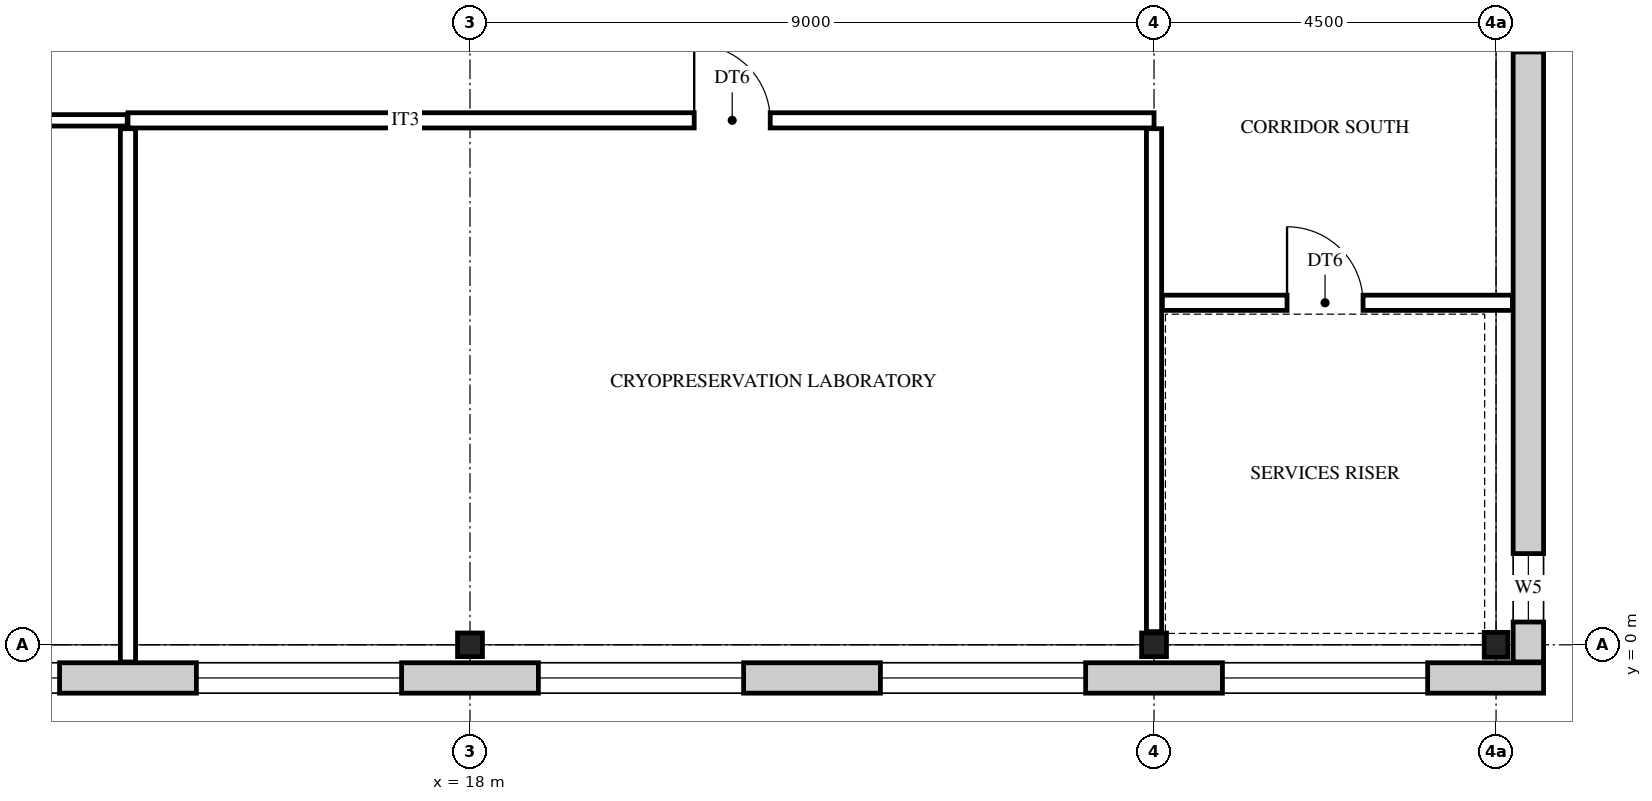
"""IFC4 building model, lengths in metres.
Left out: names, types, materials, properties, quantities, classifications, styles, units other than length and angle.
Written with IfcOpenShell. Run it as: python <this file> out.ifc"""

import sys

from ifc_helpers import new_model, si_unit, direction, frame, frame_2d, origin, origin_2d, place, context, subcontext, project, spatial, rectangle, i_section, extrude, element, fill, save


model = new_model("IFC4")
c1 = context("Model", 3, precision=1e-05, world=origin(), true_north=direction((0.0, 1.0)))
c2 = subcontext(c1, "Body", "Model", "MODEL_VIEW")
j1 = project(units=[si_unit("LENGTHUNIT", "METRE"), si_unit("PLANEANGLEUNIT", "RADIAN")], contexts=[c1])
p1 = place(None, origin())
s1 = spatial("IfcSite", under=j1, at=p1, CompositionType="ELEMENT")
p2 = place(p1, origin())
s2 = spatial("IfcBuilding", under=s1, at=p2, CompositionType="ELEMENT")
p3 = place(p2, frame((0.0, 0.0, 27.6)))
s3 = spatial("IfcBuildingStorey", under=s2, at=p3, CompositionType="ELEMENT", Elevation=27.6)
for number, where, z_axis, x_axis in (
    (1, (18.0, 0.0, 0.0), (0.0, 0.0, 1.0), (0.0, 1.0, 0.0)),
    (2, (27.0, 0.0, 0.0), (0.0, 0.0, 1.0), (0.0, 1.0, 0.0)),
    (3, (31.5, 0.0, 0.0), (0.0, 0.0, 1.0), (1.0, 0.0, 0.0)),
):
    element("IfcColumn", number, at=place(p3, frame(where, z_axis=z_axis, x_axis=x_axis)), inside=s3, PredefinedType="COLUMN", context=c2, shape_type="SweptSolid", body=[
        extrude(i_section(OverallWidth=0.311, OverallDepth=0.327, WebThickness=0.016, FlangeThickness=0.025, FilletRadius=0.017, at=origin_2d()), origin(), (0.0, 0.0, 1.0), 4.2),
    ])
p4 = place(p3, frame((32.125, -0.436, 0.0), z_axis=(0.0, 0.0, 1.0), x_axis=(-1.0, 0.0, 0.0)))
e4 = element("IfcWall", 4, at=p4, inside=s3, PredefinedType="STANDARD", context=c2, shape_type="SweptSolid", body=[
    extrude(rectangle(XDim=32.75, YDim=0.4, at=frame_2d((16.375, 0.0))), origin(), (0.0, 0.0, 1.0), 4.2),
])
p5 = place(p4, frame((28.525, 0.0, 0.9)))
e5 = element("IfcOpeningElement", 5, at=p5, cuts=e4, PredefinedType="OPENING", context=c2, shape_type="SweptSolid", body=[
    extrude(rectangle(XDim=2.7, YDim=2.5, at=frame_2d((1.35, 1.25))), frame((0.0, 0.21, 0.0), z_axis=(0.0, -1.0, 0.0), x_axis=(1.0, 0.0, 0.0)), (0.0, 0.0, 1.0), 0.42),
])
p6 = place(p4, frame((24.025, 0.0, 0.9)))
e6 = element("IfcOpeningElement", 6, at=p6, cuts=e4, PredefinedType="OPENING", context=c2, shape_type="SweptSolid", body=[
    extrude(rectangle(XDim=2.7, YDim=2.5, at=frame_2d((1.35, 1.25))), frame((0.0, 0.21, 0.0), z_axis=(0.0, -1.0, 0.0), x_axis=(1.0, 0.0, 0.0)), (0.0, 0.0, 1.0), 0.42),
])
p7 = place(p4, frame((19.525, 0.0, 0.9)))
e7 = element("IfcOpeningElement", 7, at=p7, cuts=e4, PredefinedType="OPENING", context=c2, shape_type="SweptSolid", body=[
    extrude(rectangle(XDim=2.7, YDim=2.5, at=frame_2d((1.35, 1.25))), frame((0.0, 0.21, 0.0), z_axis=(0.0, -1.0, 0.0), x_axis=(1.0, 0.0, 0.0)), (0.0, 0.0, 1.0), 0.42),
])
p8 = place(p4, frame((15.025, 0.0, 0.9)))
e8 = element("IfcOpeningElement", 8, at=p8, cuts=e4, PredefinedType="OPENING", context=c2, shape_type="SweptSolid", body=[
    extrude(rectangle(XDim=2.7, YDim=2.5, at=frame_2d((1.35, 1.25))), frame((0.0, 0.21, 0.0), z_axis=(0.0, -1.0, 0.0), x_axis=(1.0, 0.0, 0.0)), (0.0, 0.0, 1.0), 0.42),
])
p9 = place(p4, frame((10.525, 0.0, 0.9)))
e9 = element("IfcOpeningElement", 9, at=p9, cuts=e4, PredefinedType="OPENING", context=c2, shape_type="SweptSolid", body=[
    extrude(rectangle(XDim=2.7, YDim=2.5, at=frame_2d((1.35, 1.25))), frame((0.0, 0.21, 0.0), z_axis=(0.0, -1.0, 0.0), x_axis=(1.0, 0.0, 0.0)), (0.0, 0.0, 1.0), 0.42),
])
p10 = place(p4, frame((6.025, 0.0, 0.9)))
e10 = element("IfcOpeningElement", 10, at=p10, cuts=e4, PredefinedType="OPENING", context=c2, shape_type="SweptSolid", body=[
    extrude(rectangle(XDim=2.7, YDim=2.5, at=frame_2d((1.35, 1.25))), frame((0.0, 0.21, 0.0), z_axis=(0.0, -1.0, 0.0), x_axis=(1.0, 0.0, 0.0)), (0.0, 0.0, 1.0), 0.42),
])
p11 = place(p4, frame((1.525, 0.0, 0.9)))
e11 = element("IfcOpeningElement", 11, at=p11, cuts=e4, PredefinedType="OPENING", context=c2, shape_type="SweptSolid", body=[
    extrude(rectangle(XDim=2.7, YDim=2.5, at=frame_2d((1.35, 1.25))), frame((0.0, 0.21, 0.0), z_axis=(0.0, -1.0, 0.0), x_axis=(1.0, 0.0, 0.0)), (0.0, 0.0, 1.0), 0.42),
])
p12 = place(p3, frame((31.925, 27.225, 0.0), z_axis=(0.0, 0.0, 1.0), x_axis=(0.0, -1.0, 0.0)))
e12 = element("IfcWall", 12, at=p12, inside=s3, PredefinedType="STANDARD", context=c2, shape_type="SweptSolid", body=[
    extrude(rectangle(XDim=27.45, YDim=0.4, at=frame_2d((13.725, 0.0))), origin(), (0.0, 0.0, 1.0), 4.2),
])
p13 = place(p12, frame((26.025, 0.0, 0.9)))
e13 = element("IfcOpeningElement", 13, at=p13, cuts=e12, PredefinedType="OPENING", context=c2, shape_type="SweptSolid", body=[
    extrude(rectangle(XDim=0.9, YDim=2.0, at=frame_2d((0.45, 1.0))), frame((0.0, 0.21, 0.0), z_axis=(0.0, -1.0, 0.0), x_axis=(1.0, 0.0, 0.0)), (0.0, 0.0, 1.0), 0.42),
])
p14 = place(p12, frame((18.525, 0.0, 0.9)))
e14 = element("IfcOpeningElement", 14, at=p14, cuts=e12, PredefinedType="OPENING", context=c2, shape_type="SweptSolid", body=[
    extrude(rectangle(XDim=0.9, YDim=2.0, at=frame_2d((0.45, 1.0))), frame((0.0, 0.21, 0.0), z_axis=(0.0, -1.0, 0.0), x_axis=(1.0, 0.0, 0.0)), (0.0, 0.0, 1.0), 0.42),
])
p15 = place(p12, frame((15.675, 0.0, 1.6)))
e15 = element("IfcOpeningElement", 15, at=p15, cuts=e12, PredefinedType="OPENING", context=c2, shape_type="SweptSolid", body=[
    extrude(rectangle(XDim=0.6, YDim=0.9, at=frame_2d((0.3, 0.45))), frame((0.0, 0.21, 0.0), z_axis=(0.0, -1.0, 0.0), x_axis=(1.0, 0.0, 0.0)), (0.0, 0.0, 1.0), 0.42),
])
p16 = place(p12, frame((11.175, 0.0, 1.6)))
e16 = element("IfcOpeningElement", 16, at=p16, cuts=e12, PredefinedType="OPENING", context=c2, shape_type="SweptSolid", body=[
    extrude(rectangle(XDim=0.6, YDim=0.9, at=frame_2d((0.3, 0.45))), frame((0.0, 0.21, 0.0), z_axis=(0.0, -1.0, 0.0), x_axis=(1.0, 0.0, 0.0)), (0.0, 0.0, 1.0), 0.42),
])
p17 = place(p12, frame((8.025, 0.0, 0.9)))
e17 = element("IfcOpeningElement", 17, at=p17, cuts=e12, PredefinedType="OPENING", context=c2, shape_type="SweptSolid", body=[
    extrude(rectangle(XDim=0.9, YDim=2.0, at=frame_2d((0.45, 1.0))), frame((0.0, 0.21, 0.0), z_axis=(0.0, -1.0, 0.0), x_axis=(1.0, 0.0, 0.0)), (0.0, 0.0, 1.0), 0.42),
])
p18 = place(p12, frame((0.525, 0.0, 0.9)))
e18 = element("IfcOpeningElement", 18, at=p18, cuts=e12, PredefinedType="OPENING", context=c2, shape_type="SweptSolid", body=[
    extrude(rectangle(XDim=0.9, YDim=2.0, at=frame_2d((0.45, 1.0))), frame((0.0, 0.21, 0.0), z_axis=(0.0, -1.0, 0.0), x_axis=(1.0, 0.0, 0.0)), (0.0, 0.0, 1.0), 0.42),
])
p19 = place(p3, frame((13.5, -0.226, 0.0), z_axis=(0.0, 0.0, 1.0), x_axis=(0.0, 1.0, 0.0)))
e19 = element("IfcWall", 19, at=p19, inside=s3, PredefinedType="PARTITIONING", context=c2, shape_type="SweptSolid", body=[
    extrude(rectangle(XDim=7.016, YDim=0.2, at=frame_2d((3.508, 0.0))), origin(), (0.0, 0.0, 1.0), 3.537),
])
p20 = place(p3, frame((27.0, 0.174, 0.0), z_axis=(0.0, 0.0, 1.0), x_axis=(0.0, 1.0, 0.0)))
e20 = element("IfcWall", 20, at=p20, inside=s3, PredefinedType="PARTITIONING", context=c2, shape_type="SweptSolid", body=[
    extrude(rectangle(XDim=6.616, YDim=0.2, at=frame_2d((3.308, 0.0))), origin(), (0.0, 0.0, 1.0), 3.537),
])
p21 = place(p3, frame((27.11, 4.5, 0.0), z_axis=(0.0, 0.0, 1.0), x_axis=(1.0, 0.0, 0.0)))
e21 = element("IfcWall", 21, at=p21, inside=s3, PredefinedType="PARTITIONING", context=c2, shape_type="SweptSolid", body=[
    extrude(rectangle(XDim=4.605, YDim=0.2, at=frame_2d((2.302, 0.0))), origin(), (0.0, 0.0, 1.0), 3.537),
])
p22 = place(p21, frame((1.64, 0.0, 0.0)))
e22 = element("IfcOpeningElement", 22, at=p22, cuts=e21, PredefinedType="OPENING", context=c2, shape_type="SweptSolid", body=[
    extrude(rectangle(XDim=1.0, YDim=2.1, at=frame_2d((0.5, 1.05))), frame((0.0, 0.11, 0.0), z_axis=(0.0, -1.0, 0.0), x_axis=(1.0, 0.0, 0.0)), (0.0, 0.0, 1.0), 0.22),
])
p23 = place(p3, frame((6.985, 6.9, 0.0), z_axis=(0.0, 0.0, 1.0), x_axis=(1.0, 0.0, 0.0)))
e23 = element("IfcWall", 23, at=p23, inside=s3, PredefinedType="PARTITIONING", context=c2, shape_type="SweptSolid", body=[
    extrude(rectangle(XDim=6.505, YDim=0.15, at=frame_2d((3.252, 0.0))), origin(), (0.0, 0.0, 1.0), 3.537),
])
p24 = place(p23, frame((1.615, 0.0, 0.0)))
e24 = element("IfcOpeningElement", 24, at=p24, cuts=e23, PredefinedType="OPENING", context=c2, shape_type="SweptSolid", body=[
    extrude(rectangle(XDim=1.1, YDim=2.1, at=frame_2d((0.55, 1.05))), frame((0.0, 0.085, 0.0), z_axis=(0.0, -1.0, 0.0), x_axis=(1.0, 0.0, 0.0)), (0.0, 0.0, 1.0), 0.17),
])
p25 = place(p3, frame((13.5, 6.9, 0.0), z_axis=(0.0, 0.0, 1.0), x_axis=(1.0, 0.0, 0.0)))
e25 = element("IfcWall", 25, at=p25, inside=s3, PredefinedType="PARTITIONING", context=c2, shape_type="SweptSolid", body=[
    extrude(rectangle(XDim=13.5, YDim=0.2, at=frame_2d((6.75, 0.0))), origin(), (0.0, 0.0, 1.0), 3.537),
])
p26 = place(p25, frame((7.45, 0.0, 0.0)))
e26 = element("IfcOpeningElement", 26, at=p26, cuts=e25, PredefinedType="OPENING", context=c2, shape_type="SweptSolid", body=[
    extrude(rectangle(XDim=1.0, YDim=2.1, at=frame_2d((0.5, 1.05))), frame((0.0, 0.11, 0.0), z_axis=(0.0, -1.0, 0.0), x_axis=(1.0, 0.0, 0.0)), (0.0, 0.0, 1.0), 0.22),
])
p27 = place(p7, origin())
e27 = element("IfcWindow", 27, at=p27, inside=s3, PartitioningType="SINGLE_PANEL", PredefinedType="WINDOW", context=c2, shape_type="SweptSolid", body=[
    extrude(rectangle(XDim=2.7, YDim=2.5, at=frame_2d((1.35, 1.25))), frame((0.0, 0.03, 0.0), z_axis=(0.0, -1.0, 0.0), x_axis=(1.0, 0.0, 0.0)), (0.0, 0.0, 1.0), 0.06),
])
fill(e7, e27)
p28 = place(p8, origin())
e28 = element("IfcWindow", 28, at=p28, inside=s3, PartitioningType="SINGLE_PANEL", PredefinedType="WINDOW", context=c2, shape_type="SweptSolid", body=[
    extrude(rectangle(XDim=2.7, YDim=2.5, at=frame_2d((1.35, 1.25))), frame((0.0, 0.03, 0.0), z_axis=(0.0, -1.0, 0.0), x_axis=(1.0, 0.0, 0.0)), (0.0, 0.0, 1.0), 0.06),
])
fill(e8, e28)
p29 = place(p9, origin())
e29 = element("IfcWindow", 29, at=p29, inside=s3, PartitioningType="SINGLE_PANEL", PredefinedType="WINDOW", context=c2, shape_type="SweptSolid", body=[
    extrude(rectangle(XDim=2.7, YDim=2.5, at=frame_2d((1.35, 1.25))), frame((0.0, 0.03, 0.0), z_axis=(0.0, -1.0, 0.0), x_axis=(1.0, 0.0, 0.0)), (0.0, 0.0, 1.0), 0.06),
])
fill(e9, e29)
p30 = place(p10, origin())
e30 = element("IfcWindow", 30, at=p30, inside=s3, PartitioningType="SINGLE_PANEL", PredefinedType="WINDOW", context=c2, shape_type="SweptSolid", body=[
    extrude(rectangle(XDim=2.7, YDim=2.5, at=frame_2d((1.35, 1.25))), frame((0.0, 0.03, 0.0), z_axis=(0.0, -1.0, 0.0), x_axis=(1.0, 0.0, 0.0)), (0.0, 0.0, 1.0), 0.06),
])
fill(e10, e30)
p31 = place(p11, origin())
e31 = element("IfcWindow", 31, at=p31, inside=s3, PartitioningType="SINGLE_PANEL", PredefinedType="WINDOW", context=c2, shape_type="SweptSolid", body=[
    extrude(rectangle(XDim=2.7, YDim=2.5, at=frame_2d((1.35, 1.25))), frame((0.0, 0.03, 0.0), z_axis=(0.0, -1.0, 0.0), x_axis=(1.0, 0.0, 0.0)), (0.0, 0.0, 1.0), 0.06),
])
fill(e11, e31)
p32 = place(p13, origin())
e32 = element("IfcWindow", 32, at=p32, inside=s3, PartitioningType="SINGLE_PANEL", PredefinedType="WINDOW", context=c2, shape_type="SweptSolid", body=[
    extrude(rectangle(XDim=0.9, YDim=2.0, at=frame_2d((0.45, 1.0))), frame((0.0, 0.03, 0.0), z_axis=(0.0, -1.0, 0.0), x_axis=(1.0, 0.0, 0.0)), (0.0, 0.0, 1.0), 0.06),
])
fill(e13, e32)
p33 = place(p22, frame((1.0, 0.0, 0.0), z_axis=(0.0, 0.0, 1.0), x_axis=(-1.0, 0.0, 0.0)))
e33 = element("IfcDoor", 33, at=p33, inside=s3, OperationType="SINGLE_SWING_LEFT", PredefinedType="DOOR", context=c2, shape_type="SweptSolid", body=[
    extrude(rectangle(XDim=1.0, YDim=2.1, at=frame_2d((0.5, 1.05))), frame((0.0, 0.025, 0.0), z_axis=(0.0, -1.0, 0.0), x_axis=(1.0, 0.0, 0.0)), (0.0, 0.0, 1.0), 0.05),
])
fill(e22, e33)
p34 = place(p26, frame((1.0, 0.0, 0.0), z_axis=(0.0, 0.0, 1.0), x_axis=(-1.0, 0.0, 0.0)))
e34 = element("IfcDoor", 34, at=p34, inside=s3, OperationType="SINGLE_SWING_LEFT", PredefinedType="DOOR", context=c2, shape_type="SweptSolid", body=[
    extrude(rectangle(XDim=1.0, YDim=2.1, at=frame_2d((0.5, 1.05))), frame((0.0, 0.025, 0.0), z_axis=(0.0, -1.0, 0.0), x_axis=(1.0, 0.0, 0.0)), (0.0, 0.0, 1.0), 0.05),
])
fill(e26, e34)
save(model, sys.argv[1])
